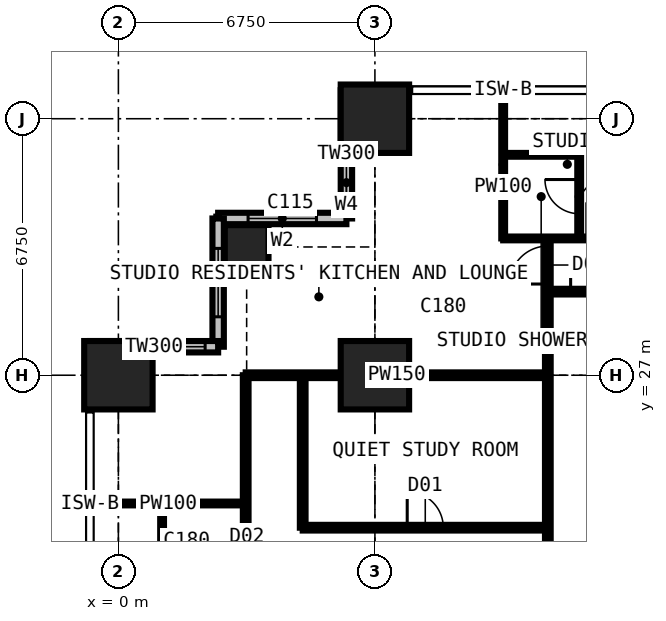
"""IFC4 building model, lengths in metres.
Left out: names, types, materials, properties, quantities, classifications, styles, units other than length and angle.
Written with IfcOpenShell. Run it as: python <this file> out.ifc"""

import sys

from ifc_helpers import new_model, si_unit, direction, frame, frame_2d, origin, origin_2d, place, context, subcontext, project, spatial, rectangle, extrude, element, fill, save


model = new_model("IFC4")
c1 = context("Model", 3, precision=1e-05, world=origin(), true_north=direction((0.0, 1.0)))
c2 = subcontext(c1, "Body", "Model", "MODEL_VIEW")
j1 = project(units=[si_unit("LENGTHUNIT", "METRE"), si_unit("PLANEANGLEUNIT", "RADIAN")], contexts=[c1])
p1 = place(None, origin())
s1 = spatial("IfcSite", under=j1, at=p1, CompositionType="ELEMENT")
p2 = place(p1, origin())
s2 = spatial("IfcBuilding", under=s1, at=p2, CompositionType="ELEMENT")
p3 = place(p2, frame((0.0, 0.0, 87.3)))
s3 = spatial("IfcBuildingStorey", under=s2, at=p3, CompositionType="ELEMENT", Elevation=87.3)
p4 = place(p3, frame((0.0, 27.0, 0.0), z_axis=(0.0, 0.0, 1.0), x_axis=(1.0, 0.0, 0.0)))
e1 = element("IfcColumn", 1, at=p4, inside=s3, PredefinedType="COLUMN", context=c2, shape_type="SweptSolid", body=[
    extrude(rectangle(XDim=1.8, YDim=1.8, at=origin_2d()), origin(), (0.0, 0.0, 1.0), 3.6),
])
p5 = place(p3, frame((3.375, 30.375, 0.0), z_axis=(0.0, 0.0, 1.0), x_axis=(1.0, 0.0, 0.0)))
e2 = element("IfcColumn", 2, at=p5, inside=s3, PredefinedType="COLUMN", context=c2, shape_type="SweptSolid", body=[
    extrude(rectangle(XDim=1.15, YDim=1.15, at=origin_2d()), origin(), (0.0, 0.0, 1.0), 3.6),
])
for number, where, z_axis, x_axis in (
    (3, (6.75, 27.0, 0.0), (0.0, 0.0, 1.0), (1.0, 0.0, 0.0)),
    (4, (6.75, 33.75, 0.0), (0.0, 0.0, 1.0), (1.0, 0.0, 0.0)),
):
    element("IfcColumn", number, at=place(p3, frame(where, z_axis=z_axis, x_axis=x_axis)), inside=s3, PredefinedType="COLUMN", context=c2, shape_type="SweptSolid", body=[
        extrude(rectangle(XDim=1.8, YDim=1.8, at=origin_2d()), origin(), (0.0, 0.0, 1.0), 3.6),
    ])
p6 = place(p3, frame((6.0, 34.5, 0.0), z_axis=(0.0, 0.0, 1.0), x_axis=(0.0, -1.0, 0.0)))
e5 = element("IfcWall", 5, at=p6, inside=s3, PredefinedType="SOLIDWALL", context=c2, shape_type="SweptSolid", body=[
    extrude(rectangle(XDim=3.375, YDim=0.3, at=frame_2d((1.688, 0.0))), origin(), (0.0, 0.0, 1.0), 3.375),
])
p7 = place(p6, frame((1.833, 0.0, 0.9)))
e6 = element("IfcOpeningElement", 6, at=p7, cuts=e5, PredefinedType="OPENING", context=c2, shape_type="SweptSolid", body=[
    extrude(rectangle(XDim=1.2, YDim=1.8, at=frame_2d((0.6, 0.9))), frame((0.0, 0.16, 0.0), z_axis=(0.0, -1.0, 0.0), x_axis=(1.0, 0.0, 0.0)), (0.0, 0.0, 1.0), 0.32),
])
p8 = place(p3, frame((6.0, 31.125, 0.0), z_axis=(0.0, 0.0, 1.0), x_axis=(-1.0, 0.0, 0.0)))
e7 = element("IfcWall", 7, at=p8, inside=s3, PredefinedType="SOLIDWALL", context=c2, shape_type="SweptSolid", body=[
    extrude(rectangle(XDim=3.375, YDim=0.3, at=frame_2d((1.688, 0.0))), origin(), (0.0, 0.0, 1.0), 3.375),
])
p9 = place(p8, frame((0.788, 0.0, 0.6)))
e8 = element("IfcOpeningElement", 8, at=p9, cuts=e7, PredefinedType="OPENING", context=c2, shape_type="SweptSolid", body=[
    extrude(rectangle(XDim=1.8, YDim=2.1, at=frame_2d((0.9, 1.05))), frame((0.0, 0.16, 0.0), z_axis=(0.0, -1.0, 0.0), x_axis=(1.0, 0.0, 0.0)), (0.0, 0.0, 1.0), 0.32),
])
p10 = place(p3, frame((2.625, 31.125, 0.0), z_axis=(0.0, 0.0, 1.0), x_axis=(0.0, -1.0, 0.0)))
e9 = element("IfcWall", 9, at=p10, inside=s3, PredefinedType="SOLIDWALL", context=c2, shape_type="SweptSolid", body=[
    extrude(rectangle(XDim=3.375, YDim=0.3, at=frame_2d((1.688, 0.0))), origin(), (0.0, 0.0, 1.0), 3.375),
])
p11 = place(p10, frame((0.788, 0.0, 0.6)))
e10 = element("IfcOpeningElement", 10, at=p11, cuts=e9, PredefinedType="OPENING", context=c2, shape_type="SweptSolid", body=[
    extrude(rectangle(XDim=1.8, YDim=2.1, at=frame_2d((0.9, 1.05))), frame((0.0, 0.16, 0.0), z_axis=(0.0, -1.0, 0.0), x_axis=(1.0, 0.0, 0.0)), (0.0, 0.0, 1.0), 0.32),
])
p12 = place(p3, frame((2.625, 27.75, 0.0), z_axis=(0.0, 0.0, 1.0), x_axis=(-1.0, 0.0, 0.0)))
e11 = element("IfcWall", 11, at=p12, inside=s3, PredefinedType="SOLIDWALL", context=c2, shape_type="SweptSolid", body=[
    extrude(rectangle(XDim=3.375, YDim=0.3, at=frame_2d((1.688, 0.0))), origin(), (0.0, 0.0, 1.0), 3.375),
])
p13 = place(p12, frame((0.343, 0.0, 0.9)))
e12 = element("IfcOpeningElement", 12, at=p13, cuts=e11, PredefinedType="OPENING", context=c2, shape_type="SweptSolid", body=[
    extrude(rectangle(XDim=1.2, YDim=1.8, at=frame_2d((0.6, 0.9))), frame((0.0, 0.16, 0.0), z_axis=(0.0, -1.0, 0.0), x_axis=(1.0, 0.0, 0.0)), (0.0, 0.0, 1.0), 0.32),
])
p14 = place(p3, frame((-0.734, 23.625, 0.0), z_axis=(0.0, 0.0, 1.0), x_axis=(1.0, 0.0, 0.0)))
e13 = element("IfcWall", 13, at=p14, inside=s3, PredefinedType="PARTITIONING", context=c2, shape_type="SweptSolid", body=[
    extrude(rectangle(XDim=4.084, YDim=0.1, at=frame_2d((2.042, 0.0))), origin(), (0.0, 0.0, 1.0), 3.375),
])
p15 = place(p3, frame((1.15, 21.625, 0.0), z_axis=(0.0, 0.0, 1.0), x_axis=(0.0, 1.0, 0.0)))
e14 = element("IfcWall", 14, at=p15, inside=s3, PredefinedType="PARTITIONING", context=c2, shape_type="SweptSolid", body=[
    extrude(rectangle(XDim=2.0, YDim=0.1, at=frame_2d((1.0, 0.0))), origin(), (0.0, 0.0, 1.0), 3.375),
])
p16 = place(p3, frame((3.35, 10.125, 0.0), z_axis=(0.0, 0.0, 1.0), x_axis=(0.0, 1.0, 0.0)))
e15 = element("IfcWall", 15, at=p16, inside=s3, PredefinedType="PARTITIONING", context=c2, shape_type="SweptSolid", body=[
    extrude(rectangle(XDim=16.875, YDim=0.15, at=frame_2d((8.438, 0.0))), origin(), (0.0, 0.0, 1.0), 3.375),
])
p17 = place(p16, frame((7.575, 0.0, 0.0)))
e16 = element("IfcOpeningElement", 16, at=p17, cuts=e15, PredefinedType="OPENING", context=c2, shape_type="SweptSolid", body=[
    extrude(rectangle(XDim=0.95, YDim=2.2, at=frame_2d((0.475, 1.1))), frame((0.0, 0.085, 0.0), z_axis=(0.0, -1.0, 0.0), x_axis=(1.0, 0.0, 0.0)), (0.0, 0.0, 1.0), 0.17),
])
p18 = place(p16, frame((0.2, 0.0, 0.0)))
e17 = element("IfcOpeningElement", 17, at=p18, cuts=e15, PredefinedType="OPENING", context=c2, shape_type="SweptSolid", body=[
    extrude(rectangle(XDim=0.95, YDim=2.2, at=frame_2d((0.475, 1.1))), frame((0.0, 0.085, 0.0), z_axis=(0.0, -1.0, 0.0), x_axis=(1.0, 0.0, 0.0)), (0.0, 0.0, 1.0), 0.17),
])
p19 = place(p16, frame((10.375, 0.0, 0.0)))
e18 = element("IfcOpeningElement", 18, at=p19, cuts=e15, PredefinedType="OPENING", context=c2, shape_type="SweptSolid", body=[
    extrude(rectangle(XDim=0.95, YDim=2.2, at=frame_2d((0.475, 1.1))), frame((0.0, 0.085, 0.0), z_axis=(0.0, -1.0, 0.0), x_axis=(1.0, 0.0, 0.0)), (0.0, 0.0, 1.0), 0.17),
])
p20 = place(p3, frame((3.35, 27.0, 0.0), z_axis=(0.0, 0.0, 1.0), x_axis=(1.0, 0.0, 0.0)))
e19 = element("IfcWall", 19, at=p20, inside=s3, PredefinedType="PARTITIONING", context=c2, shape_type="SweptSolid", body=[
    extrude(rectangle(XDim=7.95, YDim=0.15, at=frame_2d((3.975, 0.0))), origin(), (0.0, 0.0, 1.0), 2.806),
])
p21 = place(p3, frame((4.85, 22.988, 0.0), z_axis=(0.0, 0.0, 1.0), x_axis=(0.0, 1.0, 0.0)))
e20 = element("IfcWall", 20, at=p21, inside=s3, PredefinedType="PARTITIONING", context=c2, shape_type="SweptSolid", body=[
    extrude(rectangle(XDim=4.012, YDim=0.15, at=frame_2d((2.006, 0.0))), origin(), (0.0, 0.0, 1.0), 3.375),
])
p22 = place(p3, frame((4.85, 22.988, 0.0), z_axis=(0.0, 0.0, 1.0), x_axis=(1.0, 0.0, 0.0)))
e21 = element("IfcWall", 21, at=p22, inside=s3, PredefinedType="PARTITIONING", context=c2, shape_type="SweptSolid", body=[
    extrude(rectangle(XDim=6.45, YDim=0.15, at=frame_2d((3.225, 0.0))), origin(), (0.0, 0.0, 1.0), 3.375),
])
p23 = place(p22, frame((2.75, 0.0, 0.0)))
e22 = element("IfcOpeningElement", 22, at=p23, cuts=e21, PredefinedType="OPENING", context=c2, shape_type="SweptSolid", body=[
    extrude(rectangle(XDim=0.95, YDim=2.2, at=frame_2d((0.475, 1.1))), frame((0.0, 0.085, 0.0), z_axis=(0.0, -1.0, 0.0), x_axis=(1.0, 0.0, 0.0)), (0.0, 0.0, 1.0), 0.17),
])
p24 = place(p3, frame((10.125, 30.6, 0.0), z_axis=(0.0, 0.0, 1.0), x_axis=(0.0, 1.0, 0.0)))
e23 = element("IfcWall", 23, at=p24, inside=s3, PredefinedType="PARTITIONING", context=c2, shape_type="SweptSolid", body=[
    extrude(rectangle(XDim=3.884, YDim=0.1, at=frame_2d((1.942, 0.0))), origin(), (0.0, 0.0, 1.0), 3.375),
])
p25 = place(p3, frame((10.125, 30.6, 0.0), z_axis=(0.0, 0.0, 1.0), x_axis=(1.0, 0.0, 0.0)))
e24 = element("IfcWall", 24, at=p25, inside=s3, PredefinedType="PARTITIONING", context=c2, shape_type="SweptSolid", body=[
    extrude(rectangle(XDim=3.375, YDim=0.1, at=frame_2d((1.688, 0.0))), origin(), (0.0, 0.0, 1.0), 3.375),
])
p26 = place(p25, frame((2.2, 0.0, 0.0)))
e25 = element("IfcOpeningElement", 25, at=p26, cuts=e24, PredefinedType="OPENING", context=c2, shape_type="SweptSolid", body=[
    extrude(rectangle(XDim=0.95, YDim=2.2, at=frame_2d((0.475, 1.1))), frame((0.0, 0.06, 0.0), z_axis=(0.0, -1.0, 0.0), x_axis=(1.0, 0.0, 0.0)), (0.0, 0.0, 1.0), 0.12),
])
p27 = place(p3, frame((10.125, 32.8, 0.0), z_axis=(0.0, 0.0, 1.0), x_axis=(1.0, 0.0, 0.0)))
e26 = element("IfcWall", 26, at=p27, inside=s3, PredefinedType="PARTITIONING", context=c2, shape_type="SweptSolid", body=[
    extrude(rectangle(XDim=2.0, YDim=0.1, at=frame_2d((1.0, 0.0))), origin(), (0.0, 0.0, 1.0), 3.375),
])
p28 = place(p3, frame((11.3, 11.3, 0.0), z_axis=(0.0, 0.0, 1.0), x_axis=(0.0, 1.0, 0.0)))
e27 = element("IfcWall", 27, at=p28, inside=s3, PredefinedType="PARTITIONING", context=c2, shape_type="SweptSolid", body=[
    extrude(rectangle(XDim=19.3, YDim=0.15, at=frame_2d((9.65, 0.0))), origin(), (0.0, 0.0, 1.0), 3.375),
])
p29 = place(p28, frame((18.1, 0.0, 0.0)))
e28 = element("IfcOpeningElement", 28, at=p29, cuts=e27, PredefinedType="OPENING", context=c2, shape_type="SweptSolid", body=[
    extrude(rectangle(XDim=1.0, YDim=2.2, at=frame_2d((0.5, 1.1))), frame((0.0, 0.085, 0.0), z_axis=(0.0, -1.0, 0.0), x_axis=(1.0, 0.0, 0.0)), (0.0, 0.0, 1.0), 0.17),
])
p30 = place(p28, frame((10.137, 0.0, 0.0)))
e29 = element("IfcOpeningElement", 29, at=p30, cuts=e27, PredefinedType="OPENING", context=c2, shape_type="SweptSolid", body=[
    extrude(rectangle(XDim=1.0, YDim=2.2, at=frame_2d((0.5, 1.1))), frame((0.0, 0.085, 0.0), z_axis=(0.0, -1.0, 0.0), x_axis=(1.0, 0.0, 0.0)), (0.0, 0.0, 1.0), 0.17),
])
p31 = place(p3, frame((11.3, 29.2, 0.0), z_axis=(0.0, 0.0, 1.0), x_axis=(1.0, 0.0, 0.0)))
e30 = element("IfcWall", 30, at=p31, inside=s3, PredefinedType="PARTITIONING", context=c2, shape_type="SweptSolid", body=[
    extrude(rectangle(XDim=19.075, YDim=0.15, at=frame_2d((9.538, 0.0))), origin(), (0.0, 0.0, 1.0), 3.375),
])
p32 = place(p31, frame((5.825, 0.0, 0.0)))
e31 = element("IfcOpeningElement", 31, at=p32, cuts=e30, PredefinedType="OPENING", context=c2, shape_type="SweptSolid", body=[
    extrude(rectangle(XDim=0.95, YDim=2.2, at=frame_2d((0.475, 1.1))), frame((0.0, 0.085, 0.0), z_axis=(0.0, -1.0, 0.0), x_axis=(1.0, 0.0, 0.0)), (0.0, 0.0, 1.0), 0.17),
])
p33 = place(p31, frame((9.2, 0.0, 0.0)))
e32 = element("IfcOpeningElement", 32, at=p33, cuts=e30, PredefinedType="OPENING", context=c2, shape_type="SweptSolid", body=[
    extrude(rectangle(XDim=0.95, YDim=2.2, at=frame_2d((0.475, 1.1))), frame((0.0, 0.085, 0.0), z_axis=(0.0, -1.0, 0.0), x_axis=(1.0, 0.0, 0.0)), (0.0, 0.0, 1.0), 0.17),
])
p34 = place(p31, frame((12.575, 0.0, 0.0)))
e33 = element("IfcOpeningElement", 33, at=p34, cuts=e30, PredefinedType="OPENING", context=c2, shape_type="SweptSolid", body=[
    extrude(rectangle(XDim=0.95, YDim=2.2, at=frame_2d((0.475, 1.1))), frame((0.0, 0.085, 0.0), z_axis=(0.0, -1.0, 0.0), x_axis=(1.0, 0.0, 0.0)), (0.0, 0.0, 1.0), 0.17),
])
p35 = place(p31, frame((15.95, 0.0, 0.0)))
e34 = element("IfcOpeningElement", 34, at=p35, cuts=e30, PredefinedType="OPENING", context=c2, shape_type="SweptSolid", body=[
    extrude(rectangle(XDim=0.95, YDim=2.2, at=frame_2d((0.475, 1.1))), frame((0.0, 0.085, 0.0), z_axis=(0.0, -1.0, 0.0), x_axis=(1.0, 0.0, 0.0)), (0.0, 0.0, 1.0), 0.17),
])
p36 = place(p31, frame((0.6, 0.0, 0.0)))
e35 = element("IfcOpeningElement", 35, at=p36, cuts=e30, PredefinedType="OPENING", context=c2, shape_type="SweptSolid", body=[
    extrude(rectangle(XDim=1.0, YDim=2.2, at=frame_2d((0.5, 1.1))), frame((0.0, 0.085, 0.0), z_axis=(0.0, -1.0, 0.0), x_axis=(1.0, 0.0, 0.0)), (0.0, 0.0, 1.0), 0.17),
])
p37 = place(p3, frame((12.125, 30.6, 0.0), z_axis=(0.0, 0.0, 1.0), x_axis=(0.0, 1.0, 0.0)))
e36 = element("IfcWall", 36, at=p37, inside=s3, PredefinedType="PARTITIONING", context=c2, shape_type="SweptSolid", body=[
    extrude(rectangle(XDim=2.2, YDim=0.1, at=frame_2d((1.1, 0.0))), origin(), (0.0, 0.0, 1.0), 3.375),
])
p38 = place(p37, frame((0.65, 0.0, 0.0)))
e37 = element("IfcOpeningElement", 37, at=p38, cuts=e36, PredefinedType="OPENING", context=c2, shape_type="SweptSolid", body=[
    extrude(rectangle(XDim=0.9, YDim=2.2, at=frame_2d((0.45, 1.1))), frame((0.0, 0.06, 0.0), z_axis=(0.0, -1.0, 0.0), x_axis=(1.0, 0.0, 0.0)), (0.0, 0.0, 1.0), 0.12),
])
p39 = place(p7, origin())
e38 = element("IfcWindow", 38, at=p39, inside=s3, PartitioningType="SINGLE_PANEL", PredefinedType="WINDOW", context=c2, shape_type="SweptSolid", body=[
    extrude(rectangle(XDim=1.2, YDim=1.8, at=frame_2d((0.6, 0.9))), frame((0.0, 0.03, 0.0), z_axis=(0.0, -1.0, 0.0), x_axis=(1.0, 0.0, 0.0)), (0.0, 0.0, 1.0), 0.06),
])
fill(e6, e38)
p40 = place(p9, origin())
e39 = element("IfcWindow", 39, at=p40, inside=s3, PartitioningType="SINGLE_PANEL", PredefinedType="WINDOW", context=c2, shape_type="SweptSolid", body=[
    extrude(rectangle(XDim=1.8, YDim=2.1, at=frame_2d((0.9, 1.05))), frame((0.0, 0.03, 0.0), z_axis=(0.0, -1.0, 0.0), x_axis=(1.0, 0.0, 0.0)), (0.0, 0.0, 1.0), 0.06),
])
fill(e8, e39)
p41 = place(p11, origin())
e40 = element("IfcWindow", 40, at=p41, inside=s3, PartitioningType="SINGLE_PANEL", PredefinedType="WINDOW", context=c2, shape_type="SweptSolid", body=[
    extrude(rectangle(XDim=1.8, YDim=2.1, at=frame_2d((0.9, 1.05))), frame((0.0, 0.03, 0.0), z_axis=(0.0, -1.0, 0.0), x_axis=(1.0, 0.0, 0.0)), (0.0, 0.0, 1.0), 0.06),
])
fill(e10, e40)
p42 = place(p13, origin())
e41 = element("IfcWindow", 41, at=p42, inside=s3, PartitioningType="SINGLE_PANEL", PredefinedType="WINDOW", context=c2, shape_type="SweptSolid", body=[
    extrude(rectangle(XDim=1.2, YDim=1.8, at=frame_2d((0.6, 0.9))), frame((0.0, 0.03, 0.0), z_axis=(0.0, -1.0, 0.0), x_axis=(1.0, 0.0, 0.0)), (0.0, 0.0, 1.0), 0.06),
])
fill(e12, e41)
p43 = place(p38, origin())
e42 = element("IfcDoor", 42, at=p43, inside=s3, OperationType="SINGLE_SWING_RIGHT", PredefinedType="DOOR", context=c2, shape_type="SweptSolid", body=[
    extrude(rectangle(XDim=0.9, YDim=2.2, at=frame_2d((0.45, 1.1))), frame((0.0, 0.025, 0.0), z_axis=(0.0, -1.0, 0.0), x_axis=(1.0, 0.0, 0.0)), (0.0, 0.0, 1.0), 0.05),
])
fill(e37, e42)
p44 = place(p36, origin())
e43 = element("IfcDoor", 43, at=p44, inside=s3, OperationType="SINGLE_SWING_LEFT", PredefinedType="DOOR", context=c2, shape_type="SweptSolid", body=[
    extrude(rectangle(XDim=1.0, YDim=2.2, at=frame_2d((0.5, 1.1))), frame((0.0, 0.025, 0.0), z_axis=(0.0, -1.0, 0.0), x_axis=(1.0, 0.0, 0.0)), (0.0, 0.0, 1.0), 0.05),
])
fill(e35, e43)
p45 = place(p29, origin())
e44 = element("IfcDoor", 44, at=p45, inside=s3, OperationType="SINGLE_SWING_LEFT", PredefinedType="DOOR", context=c2, shape_type="SweptSolid", body=[
    extrude(rectangle(XDim=1.0, YDim=2.2, at=frame_2d((0.5, 1.1))), frame((0.0, 0.025, 0.0), z_axis=(0.0, -1.0, 0.0), x_axis=(1.0, 0.0, 0.0)), (0.0, 0.0, 1.0), 0.05),
])
fill(e28, e44)
p46 = place(p23, origin())
e45 = element("IfcDoor", 45, at=p46, inside=s3, OperationType="SINGLE_SWING_LEFT", PredefinedType="DOOR", context=c2, shape_type="SweptSolid", body=[
    extrude(rectangle(XDim=0.95, YDim=2.2, at=frame_2d((0.475, 1.1))), frame((0.0, 0.025, 0.0), z_axis=(0.0, -1.0, 0.0), x_axis=(1.0, 0.0, 0.0)), (0.0, 0.0, 1.0), 0.05),
])
fill(e22, e45)
save(model, sys.argv[1])
